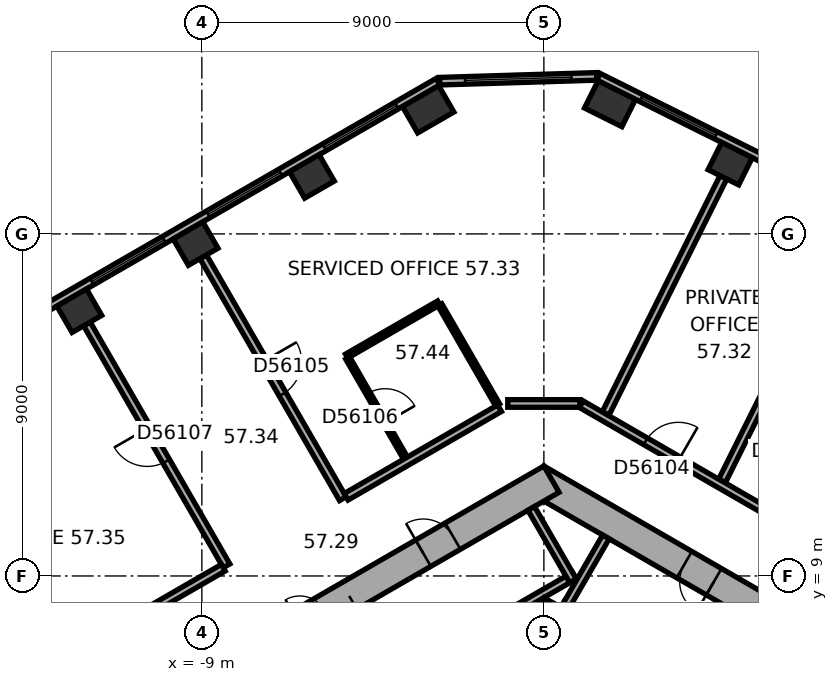
"""IFC4 building model, lengths in metres.
Left out: names, types, materials, properties, quantities, classifications, styles, units other than length and angle.
Written with IfcOpenShell. Run it as: python <this file> out.ifc"""

import sys

from ifc_helpers import new_model, si_unit, direction, frame, frame_2d, origin, origin_2d, place, context, subcontext, project, spatial, rectangle, extrude, element, fill, save


model = new_model("IFC4")
c1 = context("Model", 3, precision=1e-05, world=origin(), true_north=direction((0.0, 1.0)))
c2 = subcontext(c1, "Body", "Model", "MODEL_VIEW")
j1 = project(units=[si_unit("LENGTHUNIT", "METRE"), si_unit("PLANEANGLEUNIT", "RADIAN")], contexts=[c1])
p1 = place(None, origin())
s1 = spatial("IfcSite", under=j1, at=p1, CompositionType="ELEMENT")
p2 = place(p1, origin())
s2 = spatial("IfcBuilding", under=s1, at=p2, CompositionType="ELEMENT")
p3 = place(p2, frame((0.0, 0.0, 232.8)))
s3 = spatial("IfcBuildingStorey", under=s2, at=p3, CompositionType="ELEMENT", Elevation=232.8)
p4 = place(p3, frame((4.902, 19.848, 0.0), z_axis=(0.0, 0.0, 1.0), x_axis=(-0.894934361602, 0.44619781311, 0.0)))
e1 = element("IfcColumn", 1, at=p4, inside=s3, PredefinedType="COLUMN", context=c2, shape_type="SweptSolid", body=[
    extrude(rectangle(XDim=0.9, YDim=0.8, at=origin_2d()), origin(), (0.0, 0.0, 1.0), 3.7),
])
for number, where, z_axis, x_axis in (
    (2, (1.74, 21.425, 0.0), (0.0, 0.0, 1.0), (-0.895, 0.446, 0.0)),
    (3, (-3.044, 21.279, 0.0), (0.0, 0.0, 1.0), (-0.866, -0.5, 0.0)),
):
    element("IfcColumn", number, at=place(p3, frame(where, z_axis=z_axis, x_axis=x_axis)), inside=s3, PredefinedType="COLUMN", context=c2, shape_type="SweptSolid", body=[
        extrude(rectangle(XDim=1.1, YDim=0.8, at=origin_2d()), origin(), (0.0, 0.0, 1.0), 3.7),
    ])
for number, where, z_axis, x_axis in (
    (4, (-6.104, 19.512, 0.0), (0.0, 0.0, 1.0), (-0.866, -0.5, 0.0)),
    (5, (-9.165, 17.745, 0.0), (0.0, 0.0, 1.0), (-0.866, -0.5, 0.0)),
    (6, (-12.225, 15.978, 0.0), (0.0, 0.0, 1.0), (-0.866, -0.5, 0.0)),
):
    element("IfcColumn", number, at=place(p3, frame(where, z_axis=z_axis, x_axis=x_axis)), inside=s3, PredefinedType="COLUMN", context=c2, shape_type="SweptSolid", body=[
        extrude(rectangle(XDim=0.9, YDim=0.8, at=origin_2d()), origin(), (0.0, 0.0, 1.0), 3.7),
    ])
p5 = place(p3, frame((10.1, 5.6, 0.0), z_axis=(0.0, 0.0, 1.0), x_axis=(-0.866023897231, 0.500002609418, 0.0)))
e7 = element("IfcWall", 7, at=p5, inside=s3, PredefinedType="SHEAR", context=c2, shape_type="SweptSolid", body=[
    extrude(rectangle(XDim=11.894, YDim=0.8, at=frame_2d((5.947, 0.0))), origin(), (0.0, 0.0, 1.0), 3.7),
])
p6 = place(p5, frame((2.597, 0.0, 0.0)))
e8 = element("IfcOpeningElement", 8, at=p6, cuts=e7, PredefinedType="OPENING", context=c2, shape_type="SweptSolid", body=[
    extrude(rectangle(XDim=0.9, YDim=2.1, at=frame_2d((0.45, 1.05))), frame((0.0, 0.41, 0.0), z_axis=(0.0, -1.0, 0.0), x_axis=(1.0, 0.0, 0.0)), (0.0, 0.0, 1.0), 0.82),
])
p7 = place(p5, frame((6.497, 0.0, 0.0)))
e9 = element("IfcOpeningElement", 9, at=p7, cuts=e7, PredefinedType="OPENING", context=c2, shape_type="SweptSolid", body=[
    extrude(rectangle(XDim=0.9, YDim=2.1, at=frame_2d((0.45, 1.05))), frame((0.0, 0.41, 0.0), z_axis=(0.0, -1.0, 0.0), x_axis=(1.0, 0.0, 0.0)), (0.0, 0.0, 1.0), 0.82),
])
p8 = place(p3, frame((0.2, 11.547, 0.0), z_axis=(0.0, 0.0, 1.0), x_axis=(-0.866023897231, -0.500002609418, 0.0)))
e10 = element("IfcWall", 10, at=p8, inside=s3, PredefinedType="SHEAR", context=c2, shape_type="SweptSolid", body=[
    extrude(rectangle(XDim=11.894, YDim=0.8, at=frame_2d((5.947, 0.0))), origin(), (0.0, 0.0, 1.0), 3.7),
])
p9 = place(p8, frame((6.147, 0.0, 0.0)))
e11 = element("IfcOpeningElement", 11, at=p9, cuts=e10, PredefinedType="OPENING", context=c2, shape_type="SweptSolid", body=[
    extrude(rectangle(XDim=1.5, YDim=2.1, at=frame_2d((0.75, 1.05))), frame((0.0, 0.41, 0.0), z_axis=(0.0, -1.0, 0.0), x_axis=(1.0, 0.0, 0.0)), (0.0, 0.0, 1.0), 0.82),
])
p10 = place(p8, frame((2.997, 0.0, 0.0)))
e12 = element("IfcOpeningElement", 12, at=p10, cuts=e10, PredefinedType="OPENING", context=c2, shape_type="SweptSolid", body=[
    extrude(rectangle(XDim=0.9, YDim=2.1, at=frame_2d((0.45, 1.05))), frame((0.0, 0.41, 0.0), z_axis=(0.0, -1.0, 0.0), x_axis=(1.0, 0.0, 0.0)), (0.0, 0.0, 1.0), 0.82),
])
p11 = place(p3, frame((18.299, 13.727, 0.0), z_axis=(0.0, 0.0, 1.0), x_axis=(-0.894934554817, 0.44619742558, 0.0)))
e13 = element("IfcWall", 13, at=p11, inside=s3, PredefinedType="STANDARD", context=c2, shape_type="SweptSolid", body=[
    extrude(rectangle(XDim=18.841, YDim=0.2, at=frame_2d((9.421, 0.0))), origin(), (0.0, 0.0, 1.0), 3.7),
])
p12 = place(p11, frame((1.253, 0.0, 0.9)))
e14 = element("IfcOpeningElement", 14, at=p12, cuts=e13, PredefinedType="OPENING", context=c2, shape_type="SweptSolid", body=[
    extrude(rectangle(XDim=2.2, YDim=2.0, at=frame_2d((1.1, 1.0))), frame((0.0, 0.11, 0.0), z_axis=(0.0, -1.0, 0.0), x_axis=(1.0, 0.0, 0.0)), (0.0, 0.0, 1.0), 0.22),
])
p13 = place(p11, frame((4.786, 0.0, 0.9)))
e15 = element("IfcOpeningElement", 15, at=p13, cuts=e13, PredefinedType="OPENING", context=c2, shape_type="SweptSolid", body=[
    extrude(rectangle(XDim=2.2, YDim=2.0, at=frame_2d((1.1, 1.0))), frame((0.0, 0.11, 0.0), z_axis=(0.0, -1.0, 0.0), x_axis=(1.0, 0.0, 0.0)), (0.0, 0.0, 1.0), 0.22),
])
p14 = place(p11, frame((8.32, 0.0, 0.9)))
e16 = element("IfcOpeningElement", 16, at=p14, cuts=e13, PredefinedType="OPENING", context=c2, shape_type="SweptSolid", body=[
    extrude(rectangle(XDim=2.2, YDim=2.0, at=frame_2d((1.1, 1.0))), frame((0.0, 0.11, 0.0), z_axis=(0.0, -1.0, 0.0), x_axis=(1.0, 0.0, 0.0)), (0.0, 0.0, 1.0), 0.22),
])
p15 = place(p11, frame((11.854, 0.0, 0.9)))
e17 = element("IfcOpeningElement", 17, at=p15, cuts=e13, PredefinedType="OPENING", context=c2, shape_type="SweptSolid", body=[
    extrude(rectangle(XDim=2.2, YDim=2.0, at=frame_2d((1.1, 1.0))), frame((0.0, 0.11, 0.0), z_axis=(0.0, -1.0, 0.0), x_axis=(1.0, 0.0, 0.0)), (0.0, 0.0, 1.0), 0.22),
])
p16 = place(p11, frame((15.387, 0.0, 0.9)))
e18 = element("IfcOpeningElement", 18, at=p16, cuts=e13, PredefinedType="OPENING", context=c2, shape_type="SweptSolid", body=[
    extrude(rectangle(XDim=2.2, YDim=2.0, at=frame_2d((1.1, 1.0))), frame((0.0, 0.11, 0.0), z_axis=(0.0, -1.0, 0.0), x_axis=(1.0, 0.0, 0.0)), (0.0, 0.0, 1.0), 0.22),
])
p17 = place(p3, frame((1.389, 22.145, 0.0), z_axis=(0.0, 0.0, 1.0), x_axis=(-0.999534702881, -0.030502093955, 0.0)))
e19 = element("IfcWall", 19, at=p17, inside=s3, PredefinedType="STANDARD", context=c2, shape_type="SweptSolid", body=[
    extrude(rectangle(XDim=4.13, YDim=0.2, at=frame_2d((2.065, 0.0))), origin(), (0.0, 0.0, 1.0), 3.7),
])
p18 = place(p17, frame((0.665, 0.0, 0.9)))
e20 = element("IfcOpeningElement", 20, at=p18, cuts=e19, PredefinedType="OPENING", context=c2, shape_type="SweptSolid", body=[
    extrude(rectangle(XDim=2.8, YDim=2.0, at=frame_2d((1.4, 1.0))), frame((0.0, 0.11, 0.0), z_axis=(0.0, -1.0, 0.0), x_axis=(1.0, 0.0, 0.0)), (0.0, 0.0, 1.0), 0.22),
])
p19 = place(p3, frame((-2.786, 22.005, 0.0), z_axis=(0.0, 0.0, 1.0), x_axis=(-0.866026555358, -0.49999800541, 0.0)))
e21 = element("IfcWall", 21, at=p19, inside=s3, PredefinedType="STANDARD", context=c2, shape_type="SweptSolid", body=[
    extrude(rectangle(XDim=18.841, YDim=0.2, at=frame_2d((9.421, 0.0))), origin(), (0.0, 0.0, 1.0), 3.7),
])
p20 = place(p19, frame((1.254, 0.0, 0.9)))
e22 = element("IfcOpeningElement", 22, at=p20, cuts=e21, PredefinedType="OPENING", context=c2, shape_type="SweptSolid", body=[
    extrude(rectangle(XDim=2.2, YDim=2.0, at=frame_2d((1.1, 1.0))), frame((0.0, 0.11, 0.0), z_axis=(0.0, -1.0, 0.0), x_axis=(1.0, 0.0, 0.0)), (0.0, 0.0, 1.0), 0.22),
])
p21 = place(p19, frame((4.788, 0.0, 0.9)))
e23 = element("IfcOpeningElement", 23, at=p21, cuts=e21, PredefinedType="OPENING", context=c2, shape_type="SweptSolid", body=[
    extrude(rectangle(XDim=2.2, YDim=2.0, at=frame_2d((1.1, 1.0))), frame((0.0, 0.11, 0.0), z_axis=(0.0, -1.0, 0.0), x_axis=(1.0, 0.0, 0.0)), (0.0, 0.0, 1.0), 0.22),
])
p22 = place(p19, frame((8.321, 0.0, 0.9)))
e24 = element("IfcOpeningElement", 24, at=p22, cuts=e21, PredefinedType="OPENING", context=c2, shape_type="SweptSolid", body=[
    extrude(rectangle(XDim=2.2, YDim=2.0, at=frame_2d((1.1, 1.0))), frame((0.0, 0.11, 0.0), z_axis=(0.0, -1.0, 0.0), x_axis=(1.0, 0.0, 0.0)), (0.0, 0.0, 1.0), 0.22),
])
p23 = place(p19, frame((11.855, 0.0, 0.9)))
e25 = element("IfcOpeningElement", 25, at=p23, cuts=e21, PredefinedType="OPENING", context=c2, shape_type="SweptSolid", body=[
    extrude(rectangle(XDim=2.2, YDim=2.0, at=frame_2d((1.1, 1.0))), frame((0.0, 0.11, 0.0), z_axis=(0.0, -1.0, 0.0), x_axis=(1.0, 0.0, 0.0)), (0.0, 0.0, 1.0), 0.22),
])
p24 = place(p19, frame((15.389, 0.0, 0.9)))
e26 = element("IfcOpeningElement", 26, at=p24, cuts=e21, PredefinedType="OPENING", context=c2, shape_type="SweptSolid", body=[
    extrude(rectangle(XDim=2.2, YDim=2.0, at=frame_2d((1.1, 1.0))), frame((0.0, 0.11, 0.0), z_axis=(0.0, -1.0, 0.0), x_axis=(1.0, 0.0, 0.0)), (0.0, 0.0, 1.0), 0.22),
])
p25 = place(p3, frame((7.424, 4.259, 0.0), z_axis=(0.0, 0.0, 1.0), x_axis=(-0.866026010844, 0.49999894854, 0.0)))
e27 = element("IfcWall", 27, at=p25, inside=s3, PredefinedType="PARTITIONING", context=c2, shape_type="SweptSolid", body=[
    extrude(rectangle(XDim=8.0, YDim=0.2, at=frame_2d((4.0, 0.0))), origin(), (0.0, 0.0, 1.0), 3.42),
])
p26 = place(p3, frame((0.532, 8.122, 0.0), z_axis=(0.0, 0.0, 1.0), x_axis=(0.500077893725, 0.86598042715, 0.0)))
e28 = element("IfcWall", 28, at=p26, inside=s3, PredefinedType="PARTITIONING", context=c2, shape_type="SweptSolid", body=[
    extrude(rectangle(XDim=2.2, YDim=0.2, at=frame_2d((1.1, 0.0))), origin(), (0.0, 0.0, 1.0), 3.42),
])
p27 = place(p3, frame((0.803, 9.009, 0.0), z_axis=(0.0, 0.0, 1.0), x_axis=(-0.866028230842, -0.499995103361, 0.0)))
e29 = element("IfcWall", 29, at=p27, inside=s3, PredefinedType="PARTITIONING", context=c2, shape_type="SweptSolid", body=[
    extrude(rectangle(XDim=5.4, YDim=0.2, at=frame_2d((2.7, 0.0))), origin(), (0.0, 0.0, 1.0), 3.42),
])
p28 = place(p3, frame((0.767, 8.872, 0.0), z_axis=(0.0, 0.0, 1.0), x_axis=(-0.499994660107, 0.866028486751, 0.0)))
e30 = element("IfcWall", 30, at=p28, inside=s3, PredefinedType="PARTITIONING", context=c2, shape_type="SweptSolid", body=[
    extrude(rectangle(XDim=2.2, YDim=0.2, at=frame_2d((1.1, 0.0))), origin(), (0.0, 0.0, 1.0), 3.42),
])
p29 = place(p3, frame((-2.216, 4.282, 0.0), z_axis=(0.0, 0.0, 1.0), x_axis=(0.499977259774, 0.866038532462, 0.0)))
e31 = element("IfcWall", 31, at=p29, inside=s3, PredefinedType="SHEAR", context=c2, shape_type="SweptSolid", body=[
    extrude(rectangle(XDim=4.7, YDim=0.3, at=frame_2d((2.35, 0.0))), origin(), (0.0, 0.0, 1.0), 3.42),
])
p30 = place(p3, frame((-12.025, 15.632, 0.0), z_axis=(0.0, 0.0, 1.0), x_axis=(0.499983153418, -0.866035129944, 0.0)))
e32 = element("IfcWall", 32, at=p30, inside=s3, PredefinedType="PARTITIONING", context=c2, shape_type="SweptSolid", body=[
    extrude(rectangle(XDim=7.35, YDim=0.2, at=frame_2d((3.675, 0.0))), origin(), (0.0, 0.0, 1.0), 3.42),
])
p31 = place(p30, frame((3.175, 0.0, 0.0)))
e33 = element("IfcOpeningElement", 33, at=p31, cuts=e32, PredefinedType="OPENING", context=c2, shape_type="SweptSolid", body=[
    extrude(rectangle(XDim=1.0, YDim=2.1, at=frame_2d((0.5, 1.05))), frame((0.0, 0.11, 0.0), z_axis=(0.0, -1.0, 0.0), x_axis=(1.0, 0.0, 0.0)), (0.0, 0.0, 1.0), 0.22),
])
p32 = place(p3, frame((-8.965, 17.399, 0.0), z_axis=(0.0, 0.0, 1.0), x_axis=(0.499993683172, -0.866029050776, 0.0)))
e34 = element("IfcWall", 34, at=p32, inside=s3, PredefinedType="PARTITIONING", context=c2, shape_type="SweptSolid", body=[
    extrude(rectangle(XDim=7.35, YDim=0.2, at=frame_2d((3.675, 0.0))), origin(), (0.0, 0.0, 1.0), 2.87),
])
p33 = place(p32, frame((3.175, 0.0, 0.0)))
e35 = element("IfcOpeningElement", 35, at=p33, cuts=e34, PredefinedType="OPENING", context=c2, shape_type="SweptSolid", body=[
    extrude(rectangle(XDim=1.0, YDim=2.1, at=frame_2d((0.5, 1.05))), frame((0.0, 0.11, 0.0), z_axis=(0.0, -1.0, 0.0), x_axis=(1.0, 0.0, 0.0)), (0.0, 0.0, 1.0), 0.22),
])
p34 = place(p3, frame((-8.437, 9.217, 0.0), z_axis=(0.0, 0.0, 1.0), x_axis=(-0.866005660673, -0.500034194513, 0.0)))
e36 = element("IfcWall", 36, at=p34, inside=s3, PredefinedType="PARTITIONING", context=c2, shape_type="SweptSolid", body=[
    extrude(rectangle(XDim=3.209, YDim=0.2, at=frame_2d((1.604, 0.0))), origin(), (0.0, 0.0, 1.0), 3.42),
])
p35 = place(p3, frame((-5.191, 14.785, 0.0), z_axis=(0.0, 0.0, 1.0), x_axis=(0.866034573852, 0.49998411664, 0.0)))
e37 = element("IfcWall", 37, at=p35, inside=s3, PredefinedType="PARTITIONING", context=c2, shape_type="SweptSolid", body=[
    extrude(rectangle(XDim=2.8, YDim=0.12, at=frame_2d((1.4, 0.0))), origin(), (0.0, 0.0, 1.0), 3.42),
])
p36 = place(p3, frame((-3.641, 12.101, 0.0), z_axis=(0.0, 0.0, 1.0), x_axis=(-0.500026023896, 0.86601037836, 0.0)))
e38 = element("IfcWall", 38, at=p36, inside=s3, PredefinedType="PARTITIONING", context=c2, shape_type="SweptSolid", body=[
    extrude(rectangle(XDim=3.04, YDim=0.12, at=frame_2d((1.52, 0.0))), origin(), (0.0, 0.0, 1.0), 3.42),
])
p37 = place(p36, frame((1.07, 0.0, 0.0)))
e39 = element("IfcOpeningElement", 39, at=p37, cuts=e38, PredefinedType="OPENING", context=c2, shape_type="SweptSolid", body=[
    extrude(rectangle(XDim=0.9, YDim=2.1, at=frame_2d((0.45, 1.05))), frame((0.0, 0.07, 0.0), z_axis=(0.0, -1.0, 0.0), x_axis=(1.0, 0.0, 0.0)), (0.0, 0.0, 1.0), 0.14),
])
p38 = place(p3, frame((-2.737, 16.133, 0.0), z_axis=(0.0, 0.0, 1.0), x_axis=(0.500026023896, -0.86601037836, 0.0)))
e40 = element("IfcWall", 40, at=p38, inside=s3, PredefinedType="PARTITIONING", context=c2, shape_type="SweptSolid", body=[
    extrude(rectangle(XDim=3.04, YDim=0.12, at=frame_2d((1.52, 0.0))), origin(), (0.0, 0.0, 1.0), 3.42),
])
p39 = place(p3, frame((-1.167, 13.414, 0.0), z_axis=(0.0, 0.0, 1.0), x_axis=(-0.866023347809, -0.500003561037, 0.0)))
e41 = element("IfcWall", 41, at=p39, inside=s3, PredefinedType="PARTITIONING", context=c2, shape_type="SweptSolid", body=[
    extrude(rectangle(XDim=4.661, YDim=0.2, at=frame_2d((2.331, 0.0))), origin(), (0.0, 0.0, 1.0), 3.42),
])
p40 = place(p3, frame((0.95, 13.539, 0.0), z_axis=(0.0, 0.0, 1.0), x_axis=(-1.0, 0.0, 0.0)))
e42 = element("IfcWall", 42, at=p40, inside=s3, PredefinedType="PARTITIONING", context=c2, shape_type="SweptSolid", body=[
    extrude(rectangle(XDim=1.9, YDim=0.2, at=frame_2d((0.95, 0.0))), origin(), (0.0, 0.0, 1.0), 3.42),
])
p41 = place(p3, frame((4.723, 19.49, 0.0), z_axis=(0.0, 0.0, 1.0), x_axis=(-0.446186614574, -0.894939944898, 0.0)))
e43 = element("IfcWall", 43, at=p41, inside=s3, PredefinedType="PARTITIONING", context=c2, shape_type="SweptSolid", body=[
    extrude(rectangle(XDim=6.944, YDim=0.2, at=frame_2d((3.472, 0.0))), origin(), (0.0, 0.0, 1.0), 2.87),
])
p42 = place(p3, frame((7.886, 17.913, 0.0), z_axis=(0.0, 0.0, 1.0), x_axis=(-0.446204015428, -0.894931269213, 0.0)))
e44 = element("IfcWall", 44, at=p42, inside=s3, PredefinedType="PARTITIONING", context=c2, shape_type="SweptSolid", body=[
    extrude(rectangle(XDim=7.16, YDim=0.2, at=frame_2d((3.58, 0.0))), origin(), (0.0, 0.0, 1.0), 3.42),
])
p43 = place(p3, frame((8.505, 9.177, 0.0), z_axis=(0.0, 0.0, 1.0), x_axis=(-0.866019839902, 0.500009636803, 0.0)))
e45 = element("IfcWall", 45, at=p43, inside=s3, PredefinedType="PARTITIONING", context=c2, shape_type="SweptSolid", body=[
    extrude(rectangle(XDim=8.683, YDim=0.2, at=frame_2d((4.342, 0.0))), origin(), (0.0, 0.0, 1.0), 3.42),
])
p44 = place(p43, frame((5.73, 0.0, 0.0)))
e46 = element("IfcOpeningElement", 46, at=p44, cuts=e45, PredefinedType="OPENING", context=c2, shape_type="SweptSolid", body=[
    extrude(rectangle(XDim=1.0, YDim=2.1, at=frame_2d((0.5, 1.05))), frame((0.0, 0.11, 0.0), z_axis=(0.0, -1.0, 0.0), x_axis=(1.0, 0.0, 0.0)), (0.0, 0.0, 1.0), 0.22),
])
p45 = place(p16, origin())
e47 = element("IfcWindow", 47, at=p45, inside=s3, PartitioningType="SINGLE_PANEL", PredefinedType="WINDOW", context=c2, shape_type="SweptSolid", body=[
    extrude(rectangle(XDim=2.2, YDim=2.0, at=frame_2d((1.1, 1.0))), frame((0.0, 0.03, 0.0), z_axis=(0.0, -1.0, 0.0), x_axis=(1.0, 0.0, 0.0)), (0.0, 0.0, 1.0), 0.06),
])
fill(e18, e47)
p46 = place(p18, origin())
e48 = element("IfcWindow", 48, at=p46, inside=s3, PartitioningType="SINGLE_PANEL", PredefinedType="WINDOW", context=c2, shape_type="SweptSolid", body=[
    extrude(rectangle(XDim=2.8, YDim=2.0, at=frame_2d((1.4, 1.0))), frame((0.0, 0.03, 0.0), z_axis=(0.0, -1.0, 0.0), x_axis=(1.0, 0.0, 0.0)), (0.0, 0.0, 1.0), 0.06),
])
fill(e20, e48)
p47 = place(p20, origin())
e49 = element("IfcWindow", 49, at=p47, inside=s3, PartitioningType="SINGLE_PANEL", PredefinedType="WINDOW", context=c2, shape_type="SweptSolid", body=[
    extrude(rectangle(XDim=2.2, YDim=2.0, at=frame_2d((1.1, 1.0))), frame((0.0, 0.03, 0.0), z_axis=(0.0, -1.0, 0.0), x_axis=(1.0, 0.0, 0.0)), (0.0, 0.0, 1.0), 0.06),
])
fill(e22, e49)
p48 = place(p21, origin())
e50 = element("IfcWindow", 50, at=p48, inside=s3, PartitioningType="SINGLE_PANEL", PredefinedType="WINDOW", context=c2, shape_type="SweptSolid", body=[
    extrude(rectangle(XDim=2.2, YDim=2.0, at=frame_2d((1.1, 1.0))), frame((0.0, 0.03, 0.0), z_axis=(0.0, -1.0, 0.0), x_axis=(1.0, 0.0, 0.0)), (0.0, 0.0, 1.0), 0.06),
])
fill(e23, e50)
p49 = place(p22, origin())
e51 = element("IfcWindow", 51, at=p49, inside=s3, PartitioningType="SINGLE_PANEL", PredefinedType="WINDOW", context=c2, shape_type="SweptSolid", body=[
    extrude(rectangle(XDim=2.2, YDim=2.0, at=frame_2d((1.1, 1.0))), frame((0.0, 0.03, 0.0), z_axis=(0.0, -1.0, 0.0), x_axis=(1.0, 0.0, 0.0)), (0.0, 0.0, 1.0), 0.06),
])
fill(e24, e51)
p50 = place(p9, origin())
e52 = element("IfcDoor", 52, at=p50, inside=s3, OperationType="DOUBLE_DOOR_SINGLE_SWING", PredefinedType="DOOR", context=c2, shape_type="SweptSolid", body=[
    extrude(rectangle(XDim=1.5, YDim=2.1, at=frame_2d((0.75, 1.05))), frame((0.0, 0.025, 0.0), z_axis=(0.0, -1.0, 0.0), x_axis=(1.0, 0.0, 0.0)), (0.0, 0.0, 1.0), 0.05),
])
fill(e11, e52)
p51 = place(p7, origin())
e53 = element("IfcDoor", 53, at=p51, inside=s3, OperationType="SINGLE_SWING_LEFT", PredefinedType="DOOR", context=c2, shape_type="SweptSolid", body=[
    extrude(rectangle(XDim=0.9, YDim=2.1, at=frame_2d((0.45, 1.05))), frame((0.0, 0.025, 0.0), z_axis=(0.0, -1.0, 0.0), x_axis=(1.0, 0.0, 0.0)), (0.0, 0.0, 1.0), 0.05),
])
fill(e9, e53)
p52 = place(p10, origin())
e54 = element("IfcDoor", 54, at=p52, inside=s3, OperationType="SINGLE_SWING_LEFT", PredefinedType="DOOR", context=c2, shape_type="SweptSolid", body=[
    extrude(rectangle(XDim=0.9, YDim=2.1, at=frame_2d((0.45, 1.05))), frame((0.0, 0.025, 0.0), z_axis=(0.0, -1.0, 0.0), x_axis=(1.0, 0.0, 0.0)), (0.0, 0.0, 1.0), 0.05),
])
fill(e12, e54)
p53 = place(p44, origin())
e55 = element("IfcDoor", 55, at=p53, inside=s3, OperationType="SINGLE_SWING_LEFT", PredefinedType="DOOR", context=c2, shape_type="SweptSolid", body=[
    extrude(rectangle(XDim=1.0, YDim=2.1, at=frame_2d((0.5, 1.05))), frame((0.0, 0.025, 0.0), z_axis=(0.0, -1.0, 0.0), x_axis=(1.0, 0.0, 0.0)), (0.0, 0.0, 1.0), 0.05),
])
fill(e46, e55)
p54 = place(p33, origin())
e56 = element("IfcDoor", 56, at=p54, inside=s3, OperationType="SINGLE_SWING_LEFT", PredefinedType="DOOR", context=c2, shape_type="SweptSolid", body=[
    extrude(rectangle(XDim=1.0, YDim=2.1, at=frame_2d((0.5, 1.05))), frame((0.0, 0.025, 0.0), z_axis=(0.0, -1.0, 0.0), x_axis=(1.0, 0.0, 0.0)), (0.0, 0.0, 1.0), 0.05),
])
fill(e35, e56)
p55 = place(p37, origin())
e57 = element("IfcDoor", 57, at=p55, inside=s3, OperationType="SINGLE_SWING_LEFT", PredefinedType="DOOR", context=c2, shape_type="SweptSolid", body=[
    extrude(rectangle(XDim=0.9, YDim=2.1, at=frame_2d((0.45, 1.05))), frame((0.0, 0.025, 0.0), z_axis=(0.0, -1.0, 0.0), x_axis=(1.0, 0.0, 0.0)), (0.0, 0.0, 1.0), 0.05),
])
fill(e39, e57)
p56 = place(p31, origin())
e58 = element("IfcDoor", 58, at=p56, inside=s3, OperationType="SINGLE_SWING_LEFT", PredefinedType="DOOR", context=c2, shape_type="SweptSolid", body=[
    extrude(rectangle(XDim=1.0, YDim=2.1, at=frame_2d((0.5, 1.05))), frame((0.0, 0.025, 0.0), z_axis=(0.0, -1.0, 0.0), x_axis=(1.0, 0.0, 0.0)), (0.0, 0.0, 1.0), 0.05),
])
fill(e33, e58)
save(model, sys.argv[1])
